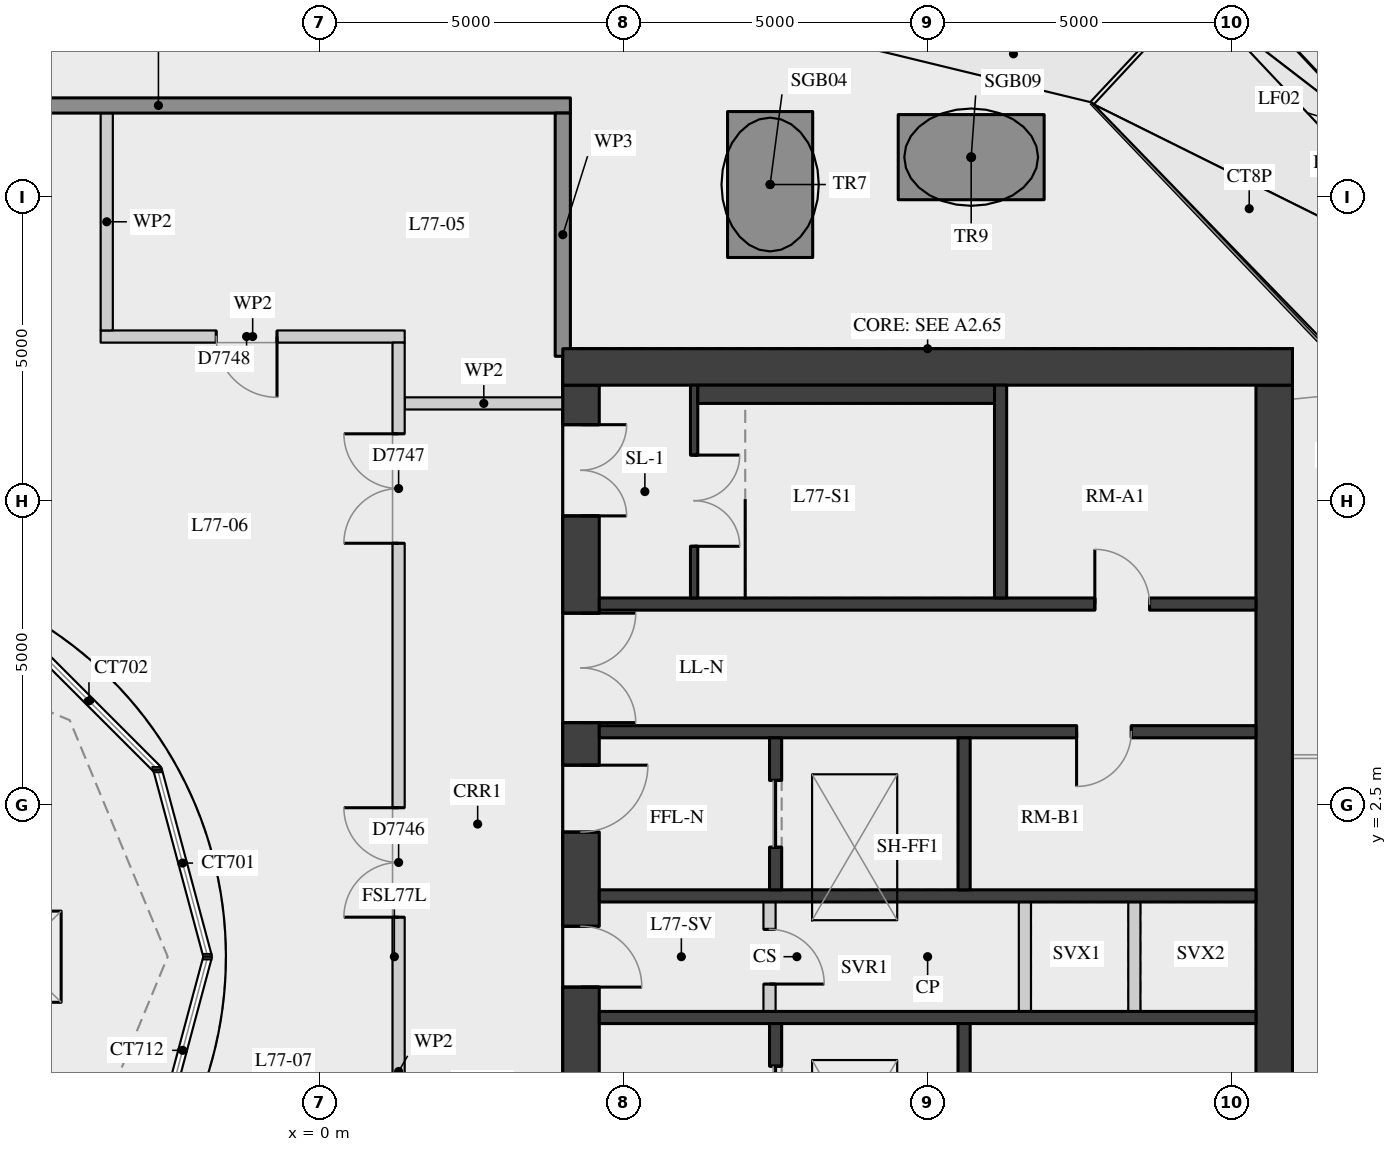
"""IFC4 building model, lengths in metres.
Left out: names, types, materials, properties, quantities, classifications, styles, units other than length and angle.
Written with IfcOpenShell. Run it as: python <this file> out.ifc"""

import sys

from ifc_helpers import new_model, si_unit, direction, frame, frame_2d, origin, origin_2d, place, context, subcontext, project, spatial, rectangle, extrude, element, fill, save


model = new_model("IFC4")
c1 = context("Model", 3, precision=1e-05, world=origin(), true_north=direction((0.0, 1.0)))
c2 = subcontext(c1, "Body", "Model", "MODEL_VIEW")
j1 = project(units=[si_unit("LENGTHUNIT", "METRE"), si_unit("PLANEANGLEUNIT", "RADIAN")], contexts=[c1])
p1 = place(None, origin())
s1 = spatial("IfcSite", under=j1, at=p1, CompositionType="ELEMENT")
p2 = place(p1, origin())
s2 = spatial("IfcBuilding", under=s1, at=p2, CompositionType="ELEMENT")
p3 = place(p2, frame((0.0, 0.0, 275.2)))
s3 = spatial("IfcBuildingStorey", under=s2, at=p3, CompositionType="ELEMENT", Elevation=275.2)
p4 = place(p3, frame((18.836, 14.586, 0.0), z_axis=(0.0, 0.0, 1.0), x_axis=(-0.742122328142, 0.670264462786, 0.0)))
e1 = element("IfcWall", 1, at=p4, inside=s3, PredefinedType="PARAPET", context=c2, shape_type="SweptSolid", body=[
    extrude(rectangle(XDim=4.179, YDim=0.25, at=frame_2d((2.089, 0.0))), origin(), (0.0, 0.0, 1.0), 1.2),
])
for number, where, z_axis, x_axis in (
    (2, (7.41, 11.5, 0.0), (0.0, 0.0, 1.0), (0.0, 1.0, 0.0)),
    (3, (11.917, 13.15, 0.0), (0.0, 0.0, 1.0), (-1.0, 0.0, 0.0)),
):
    element("IfcWall", number, at=place(p3, frame(where, z_axis=z_axis, x_axis=x_axis)), inside=s3, PredefinedType="USERDEFINED", context=c2, shape_type="SweptSolid", body=[
        extrude(rectangle(XDim=2.4, YDim=1.4, at=frame_2d((1.2, 0.0))), origin(), (0.0, 0.0, 1.0), 0.45),
    ])
p5 = place(p3, frame((4.3, -9.4, 0.0), z_axis=(0.0, 0.0, 1.0), x_axis=(0.0, 1.0, 0.0)))
e4 = element("IfcWall", 4, at=p5, inside=s3, PredefinedType="SHEAR", context=c2, shape_type="SweptSolid", body=[
    extrude(rectangle(XDim=18.8, YDim=0.6, at=frame_2d((9.4, 0.0))), origin(), (0.0, 0.0, 1.0), 5.0),
])
p6 = place(p5, frame((0.65, 0.0, 0.0)))
e5 = element("IfcOpeningElement", 5, at=p6, cuts=e4, PredefinedType="OPENING", context=c2, shape_type="SweptSolid", body=[
    extrude(rectangle(XDim=1.5, YDim=2.1, at=frame_2d((0.75, 1.05))), frame((0.0, 0.31, 0.0), z_axis=(0.0, -1.0, 0.0), x_axis=(1.0, 0.0, 0.0)), (0.0, 0.0, 1.0), 0.62),
])
p7 = place(p5, frame((3.75, 0.0, 0.0)))
e6 = element("IfcOpeningElement", 6, at=p7, cuts=e4, PredefinedType="OPENING", context=c2, shape_type="SweptSolid", body=[
    extrude(rectangle(XDim=1.8, YDim=2.1, at=frame_2d((0.9, 1.05))), frame((0.0, 0.31, 0.0), z_axis=(0.0, -1.0, 0.0), x_axis=(1.0, 0.0, 0.0)), (0.0, 0.0, 1.0), 0.62),
])
p8 = place(p5, frame((6.25, 0.0, 0.0)))
e7 = element("IfcOpeningElement", 7, at=p8, cuts=e4, PredefinedType="OPENING", context=c2, shape_type="SweptSolid", body=[
    extrude(rectangle(XDim=1.1, YDim=2.1, at=frame_2d((0.55, 1.05))), frame((0.0, 0.31, 0.0), z_axis=(0.0, -1.0, 0.0), x_axis=(1.0, 0.0, 0.0)), (0.0, 0.0, 1.0), 0.62),
])
p9 = place(p5, frame((8.9, 0.0, 0.0)))
e8 = element("IfcOpeningElement", 8, at=p9, cuts=e4, PredefinedType="OPENING", context=c2, shape_type="SweptSolid", body=[
    extrude(rectangle(XDim=1.0, YDim=2.1, at=frame_2d((0.5, 1.05))), frame((0.0, 0.31, 0.0), z_axis=(0.0, -1.0, 0.0), x_axis=(1.0, 0.0, 0.0)), (0.0, 0.0, 1.0), 0.62),
])
p10 = place(p5, frame((11.45, 0.0, 0.0)))
e9 = element("IfcOpeningElement", 9, at=p10, cuts=e4, PredefinedType="OPENING", context=c2, shape_type="SweptSolid", body=[
    extrude(rectangle(XDim=1.1, YDim=2.1, at=frame_2d((0.55, 1.05))), frame((0.0, 0.31, 0.0), z_axis=(0.0, -1.0, 0.0), x_axis=(1.0, 0.0, 0.0)), (0.0, 0.0, 1.0), 0.62),
])
p11 = place(p5, frame((13.25, 0.0, 0.0)))
e10 = element("IfcOpeningElement", 10, at=p11, cuts=e4, PredefinedType="OPENING", context=c2, shape_type="SweptSolid", body=[
    extrude(rectangle(XDim=1.8, YDim=2.1, at=frame_2d((0.9, 1.05))), frame((0.0, 0.31, 0.0), z_axis=(0.0, -1.0, 0.0), x_axis=(1.0, 0.0, 0.0)), (0.0, 0.0, 1.0), 0.62),
])
p12 = place(p5, frame((16.65, 0.0, 0.0)))
e11 = element("IfcOpeningElement", 11, at=p12, cuts=e4, PredefinedType="OPENING", context=c2, shape_type="SweptSolid", body=[
    extrude(rectangle(XDim=1.5, YDim=2.1, at=frame_2d((0.75, 1.05))), frame((0.0, 0.31, 0.0), z_axis=(0.0, -1.0, 0.0), x_axis=(1.0, 0.0, 0.0)), (0.0, 0.0, 1.0), 0.62),
])
p13 = place(p3, frame((15.7, -9.4, 0.0), z_axis=(0.0, 0.0, 1.0), x_axis=(0.0, 1.0, 0.0)))
e12 = element("IfcWall", 12, at=p13, inside=s3, PredefinedType="SHEAR", context=c2, shape_type="SweptSolid", body=[
    extrude(rectangle(XDim=18.8, YDim=0.6, at=frame_2d((9.4, 0.0))), origin(), (0.0, 0.0, 1.0), 5.0),
])
p14 = place(p3, frame((4.0, 9.7, 0.0), z_axis=(0.0, 0.0, 1.0), x_axis=(1.0, 0.0, 0.0)))
e13 = element("IfcWall", 13, at=p14, inside=s3, PredefinedType="SHEAR", context=c2, shape_type="SweptSolid", body=[
    extrude(rectangle(XDim=12.0, YDim=0.6, at=frame_2d((6.0, 0.0))), origin(), (0.0, 0.0, 1.0), 5.0),
])
p15 = place(p3, frame((4.6, 5.8, 0.0), z_axis=(0.0, 0.0, 1.0), x_axis=(1.0, 0.0, 0.0)))
e14 = element("IfcWall", 14, at=p15, inside=s3, PredefinedType="SHEAR", context=c2, shape_type="SweptSolid", body=[
    extrude(rectangle(XDim=10.8, YDim=0.2, at=frame_2d((5.4, 0.0))), origin(), (0.0, 0.0, 1.0), 5.0),
])
p16 = place(p15, frame((8.15, 0.0, 0.0)))
e15 = element("IfcOpeningElement", 15, at=p16, cuts=e14, PredefinedType="OPENING", context=c2, shape_type="SweptSolid", body=[
    extrude(rectangle(XDim=0.9, YDim=2.1, at=frame_2d((0.45, 1.05))), frame((0.0, 0.11, 0.0), z_axis=(0.0, -1.0, 0.0), x_axis=(1.0, 0.0, 0.0)), (0.0, 0.0, 1.0), 0.22),
])
p17 = place(p3, frame((4.6, 3.7, 0.0), z_axis=(0.0, 0.0, 1.0), x_axis=(1.0, 0.0, 0.0)))
e16 = element("IfcWall", 16, at=p17, inside=s3, PredefinedType="SHEAR", context=c2, shape_type="SweptSolid", body=[
    extrude(rectangle(XDim=10.8, YDim=0.2, at=frame_2d((5.4, 0.0))), origin(), (0.0, 0.0, 1.0), 5.0),
])
p18 = place(p17, frame((7.85, 0.0, 0.0)))
e17 = element("IfcOpeningElement", 17, at=p18, cuts=e16, PredefinedType="OPENING", context=c2, shape_type="SweptSolid", body=[
    extrude(rectangle(XDim=0.9, YDim=2.1, at=frame_2d((0.45, 1.05))), frame((0.0, 0.11, 0.0), z_axis=(0.0, -1.0, 0.0), x_axis=(1.0, 0.0, 0.0)), (0.0, 0.0, 1.0), 0.22),
])
for number, where, z_axis, x_axis in (
    (18, (4.6, 1.0, 0.0), (0.0, 0.0, 1.0), (1.0, 0.0, 0.0)),
    (19, (4.6, -1.0, 0.0), (0.0, 0.0, 1.0), (1.0, 0.0, 0.0)),
):
    element("IfcWall", number, at=place(p3, frame(where, z_axis=z_axis, x_axis=x_axis)), inside=s3, PredefinedType="SHEAR", context=c2, shape_type="SweptSolid", body=[
        extrude(rectangle(XDim=10.8, YDim=0.2, at=frame_2d((5.4, 0.0))), origin(), (0.0, 0.0, 1.0), 5.0),
    ])
p19 = place(p3, frame((11.2, 5.9, 0.0), z_axis=(0.0, 0.0, 1.0), x_axis=(0.0, 1.0, 0.0)))
e20 = element("IfcWall", 20, at=p19, inside=s3, PredefinedType="SHEAR", context=c2, shape_type="SweptSolid", body=[
    extrude(rectangle(XDim=3.5, YDim=0.2, at=frame_2d((1.75, 0.0))), origin(), (0.0, 0.0, 1.0), 5.0),
])
p20 = place(p3, frame((7.5, 1.1, 0.0), z_axis=(0.0, 0.0, 1.0), x_axis=(0.0, 1.0, 0.0)))
e21 = element("IfcWall", 21, at=p20, inside=s3, PredefinedType="SHEAR", context=c2, shape_type="SweptSolid", body=[
    extrude(rectangle(XDim=2.5, YDim=0.2, at=frame_2d((1.25, 0.0))), origin(), (0.0, 0.0, 1.0), 5.0),
])
p21 = place(p20, frame((0.7, 0.0, 0.0)))
e22 = element("IfcOpeningElement", 22, at=p21, cuts=e21, PredefinedType="OPENING", context=c2, shape_type="SweptSolid", body=[
    extrude(rectangle(XDim=1.1, YDim=2.1, at=frame_2d((0.55, 1.05))), frame((0.0, 0.11, 0.0), z_axis=(0.0, -1.0, 0.0), x_axis=(1.0, 0.0, 0.0)), (0.0, 0.0, 1.0), 0.22),
])
p22 = place(p3, frame((7.5, -3.6, 0.0), z_axis=(0.0, 0.0, 1.0), x_axis=(0.0, 1.0, 0.0)))
e23 = element("IfcWall", 23, at=p22, inside=s3, PredefinedType="SHEAR", context=c2, shape_type="SweptSolid", body=[
    extrude(rectangle(XDim=2.5, YDim=0.2, at=frame_2d((1.25, 0.0))), origin(), (0.0, 0.0, 1.0), 5.0),
])
p23 = place(p22, frame((0.7, 0.0, 0.0)))
e24 = element("IfcOpeningElement", 24, at=p23, cuts=e23, PredefinedType="OPENING", context=c2, shape_type="SweptSolid", body=[
    extrude(rectangle(XDim=1.1, YDim=2.1, at=frame_2d((0.55, 1.05))), frame((0.0, 0.11, 0.0), z_axis=(0.0, -1.0, 0.0), x_axis=(1.0, 0.0, 0.0)), (0.0, 0.0, 1.0), 0.22),
])
for number, where, z_axis, x_axis in (
    (25, (10.6, 1.1, 0.0), (0.0, 0.0, 1.0), (0.0, 1.0, 0.0)),
    (26, (10.6, -3.6, 0.0), (0.0, 0.0, 1.0), (0.0, 1.0, 0.0)),
):
    element("IfcWall", number, at=place(p3, frame(where, z_axis=z_axis, x_axis=x_axis)), inside=s3, PredefinedType="SHEAR", context=c2, shape_type="SweptSolid", body=[
        extrude(rectangle(XDim=2.5, YDim=0.2, at=frame_2d((1.25, 0.0))), origin(), (0.0, 0.0, 1.0), 5.0),
    ])
p24 = place(p3, frame((6.16, 5.9, 0.0), z_axis=(0.0, 0.0, 1.0), x_axis=(0.0, 1.0, 0.0)))
e27 = element("IfcWall", 27, at=p24, inside=s3, PredefinedType="SHEAR", context=c2, shape_type="SweptSolid", body=[
    extrude(rectangle(XDim=3.5, YDim=0.12, at=frame_2d((1.75, 0.0))), origin(), (0.0, 0.0, 1.0), 5.0),
])
p25 = place(p24, frame((0.85, 0.0, 0.0)))
e28 = element("IfcOpeningElement", 28, at=p25, cuts=e27, PredefinedType="OPENING", context=c2, shape_type="SweptSolid", body=[
    extrude(rectangle(XDim=1.5, YDim=2.1, at=frame_2d((0.75, 1.05))), frame((0.0, 0.07, 0.0), z_axis=(0.0, -1.0, 0.0), x_axis=(1.0, 0.0, 0.0)), (0.0, 0.0, 1.0), 0.14),
])
p26 = place(p3, frame((7.4, -0.9, 0.0), z_axis=(0.0, 0.0, 1.0), x_axis=(0.0, 1.0, 0.0)))
e29 = element("IfcWall", 29, at=p26, inside=s3, PredefinedType="PARTITIONING", context=c2, shape_type="SweptSolid", body=[
    extrude(rectangle(XDim=1.8, YDim=0.2, at=frame_2d((0.9, 0.0))), origin(), (0.0, 0.0, 1.0), 5.0),
])
p27 = place(p26, frame((0.45, 0.0, 0.0)))
e30 = element("IfcOpeningElement", 30, at=p27, cuts=e29, PredefinedType="OPENING", context=c2, shape_type="SweptSolid", body=[
    extrude(rectangle(XDim=0.9, YDim=2.1, at=frame_2d((0.45, 1.05))), frame((0.0, 0.11, 0.0), z_axis=(0.0, -1.0, 0.0), x_axis=(1.0, 0.0, 0.0)), (0.0, 0.0, 1.0), 0.22),
])
for number, where, z_axis, x_axis in (
    (31, (11.6, -0.9, 0.0), (0.0, 0.0, 1.0), (0.0, 1.0, 0.0)),
    (32, (13.4, -0.9, 0.0), (0.0, 0.0, 1.0), (0.0, 1.0, 0.0)),
):
    element("IfcWall", number, at=place(p3, frame(where, z_axis=z_axis, x_axis=x_axis)), inside=s3, PredefinedType="PARTITIONING", context=c2, shape_type="SweptSolid", body=[
        extrude(rectangle(XDim=1.8, YDim=0.2, at=frame_2d((0.9, 0.0))), origin(), (0.0, 0.0, 1.0), 5.0),
    ])
p28 = place(p3, frame((6.22, 9.25, 0.0), z_axis=(0.0, 0.0, 1.0), x_axis=(1.0, 0.0, 0.0)))
e33 = element("IfcWall", 33, at=p28, inside=s3, PredefinedType="PARTITIONING", context=c2, shape_type="SweptSolid", body=[
    extrude(rectangle(XDim=4.88, YDim=0.3, at=frame_2d((2.44, 0.0))), origin(), (0.0, 0.0, 1.0), 5.0),
])
p29 = place(p3, frame((1.4, 9.1, 0.0), z_axis=(0.0, 0.0, 1.0), x_axis=(1.0, 0.0, 0.0)))
e34 = element("IfcWall", 34, at=p29, inside=s3, PredefinedType="PARTITIONING", context=c2, shape_type="SweptSolid", body=[
    extrude(rectangle(XDim=2.602, YDim=0.2, at=frame_2d((1.301, 0.0))), origin(), (0.0, 0.0, 1.0), 6.0),
])
p30 = place(p3, frame((-3.6, 10.2, 0.0), z_axis=(0.0, 0.0, 1.0), x_axis=(1.0, 0.0, 0.0)))
e35 = element("IfcWall", 35, at=p30, inside=s3, PredefinedType="PARTITIONING", context=c2, shape_type="SweptSolid", body=[
    extrude(rectangle(XDim=5.0, YDim=0.2, at=frame_2d((2.5, 0.0))), origin(), (0.0, 0.0, 1.0), 6.0),
])
p31 = place(p30, frame((1.9, 0.0, 0.0)))
e36 = element("IfcOpeningElement", 36, at=p31, cuts=e35, PredefinedType="OPENING", context=c2, shape_type="SweptSolid", body=[
    extrude(rectangle(XDim=1.0, YDim=2.1, at=frame_2d((0.5, 1.05))), frame((0.0, 0.11, 0.0), z_axis=(0.0, -1.0, 0.0), x_axis=(1.0, 0.0, 0.0)), (0.0, 0.0, 1.0), 0.22),
])
p32 = place(p3, frame((-9.425, 14.0, 0.0), z_axis=(0.0, 0.0, 1.0), x_axis=(1.0, 0.0, 0.0)))
e37 = element("IfcWall", 37, at=p32, inside=s3, PredefinedType="PARTITIONING", context=c2, shape_type="SweptSolid", body=[
    extrude(rectangle(XDim=13.55, YDim=0.25, at=frame_2d((6.775, 0.0))), origin(), (0.0, 0.0, 1.0), 6.0),
])
p33 = place(p32, frame((2.025, 0.0, 0.0)))
e38 = element("IfcOpeningElement", 38, at=p33, cuts=e37, PredefinedType="OPENING", context=c2, shape_type="SweptSolid", body=[
    extrude(rectangle(XDim=1.8, YDim=2.4, at=frame_2d((0.9, 1.2))), frame((0.0, 0.135, 0.0), z_axis=(0.0, -1.0, 0.0), x_axis=(1.0, 0.0, 0.0)), (0.0, 0.0, 1.0), 0.27),
])
p34 = place(p3, frame((-3.5, 10.3, 0.0), z_axis=(0.0, 0.0, 1.0), x_axis=(0.0, 1.0, 0.0)))
e39 = element("IfcWall", 39, at=p34, inside=s3, PredefinedType="PARTITIONING", context=c2, shape_type="SweptSolid", body=[
    extrude(rectangle(XDim=3.575, YDim=0.2, at=frame_2d((1.788, 0.0))), origin(), (0.0, 0.0, 1.0), 6.0),
])
p35 = place(p3, frame((1.3, -13.875, 0.0), z_axis=(0.0, 0.0, 1.0), x_axis=(0.0, 1.0, 0.0)))
e40 = element("IfcWall", 40, at=p35, inside=s3, PredefinedType="PARTITIONING", context=c2, shape_type="SweptSolid", body=[
    extrude(rectangle(XDim=23.975, YDim=0.2, at=frame_2d((11.988, 0.0))), origin(), (0.0, 0.0, 1.0), 6.0),
])
p36 = place(p35, frame((20.675, 0.0, 0.0)))
e41 = element("IfcOpeningElement", 41, at=p36, cuts=e40, PredefinedType="OPENING", context=c2, shape_type="SweptSolid", body=[
    extrude(rectangle(XDim=1.8, YDim=2.1, at=frame_2d((0.9, 1.05))), frame((0.0, 0.11, 0.0), z_axis=(0.0, -1.0, 0.0), x_axis=(1.0, 0.0, 0.0)), (0.0, 0.0, 1.0), 0.22),
])
p37 = place(p35, frame((14.525, 0.0, 0.0)))
e42 = element("IfcOpeningElement", 42, at=p37, cuts=e40, PredefinedType="OPENING", context=c2, shape_type="SweptSolid", body=[
    extrude(rectangle(XDim=1.8, YDim=2.1, at=frame_2d((0.9, 1.05))), frame((0.0, 0.11, 0.0), z_axis=(0.0, -1.0, 0.0), x_axis=(1.0, 0.0, 0.0)), (0.0, 0.0, 1.0), 0.22),
])
p38 = place(p35, frame((0.975, 0.0, 0.0)))
e43 = element("IfcOpeningElement", 43, at=p38, cuts=e40, PredefinedType="OPENING", context=c2, shape_type="SweptSolid", body=[
    extrude(rectangle(XDim=1.0, YDim=2.1, at=frame_2d((0.5, 1.05))), frame((0.0, 0.11, 0.0), z_axis=(0.0, -1.0, 0.0), x_axis=(1.0, 0.0, 0.0)), (0.0, 0.0, 1.0), 0.22),
])
p39 = place(p35, frame((3.825, 0.0, 0.0)))
e44 = element("IfcOpeningElement", 44, at=p39, cuts=e40, PredefinedType="OPENING", context=c2, shape_type="SweptSolid", body=[
    extrude(rectangle(XDim=1.0, YDim=2.1, at=frame_2d((0.5, 1.05))), frame((0.0, 0.11, 0.0), z_axis=(0.0, -1.0, 0.0), x_axis=(1.0, 0.0, 0.0)), (0.0, 0.0, 1.0), 0.22),
])
p40 = place(p35, frame((6.425, 0.0, 0.0)))
e45 = element("IfcOpeningElement", 45, at=p40, cuts=e40, PredefinedType="OPENING", context=c2, shape_type="SweptSolid", body=[
    extrude(rectangle(XDim=1.0, YDim=2.1, at=frame_2d((0.5, 1.05))), frame((0.0, 0.11, 0.0), z_axis=(0.0, -1.0, 0.0), x_axis=(1.0, 0.0, 0.0)), (0.0, 0.0, 1.0), 0.22),
])
p41 = place(p3, frame((4.0, 9.875, 0.0), z_axis=(0.0, 0.0, 1.0), x_axis=(0.0, 1.0, 0.0)))
e46 = element("IfcWall", 46, at=p41, inside=s3, PredefinedType="PARTITIONING", context=c2, shape_type="SweptSolid", body=[
    extrude(rectangle(XDim=4.0, YDim=0.25, at=frame_2d((2.0, 0.0))), origin(), (0.0, 0.0, 1.0), 6.0),
])
p42 = place(p3, frame((0.0, 0.0, 1.8)))
p43 = place(p42, frame((-5.0, 0.0, 0.0)))
p44 = place(p43, frame((0.0, 0.0, 0.1)))
e47 = element("IfcWindow", 47, at=p44, inside=s3, PartitioningType="SINGLE_PANEL", PredefinedType="SKYLIGHT", context=c2, shape_type="SweptSolid", body=[
    extrude(rectangle(XDim=1.5, YDim=1.5, at=origin_2d()), origin(), (0.0, 0.0, 1.0), 0.05),
])
p45 = place(p9, origin())
e48 = element("IfcDoor", 48, at=p45, inside=s3, OperationType="SINGLE_SWING_RIGHT", PredefinedType="DOOR", context=c2, shape_type="SweptSolid", body=[
    extrude(rectangle(XDim=1.0, YDim=2.1, at=frame_2d((0.5, 1.05))), frame((0.0, 0.025, 0.0), z_axis=(0.0, -1.0, 0.0), x_axis=(1.0, 0.0, 0.0)), (0.0, 0.0, 1.0), 0.05),
])
fill(e8, e48)
p46 = place(p10, origin())
e49 = element("IfcDoor", 49, at=p46, inside=s3, OperationType="SINGLE_SWING_LEFT", PredefinedType="DOOR", context=c2, shape_type="SweptSolid", body=[
    extrude(rectangle(XDim=1.1, YDim=2.1, at=frame_2d((0.55, 1.05))), frame((0.0, 0.025, 0.0), z_axis=(0.0, -1.0, 0.0), x_axis=(1.0, 0.0, 0.0)), (0.0, 0.0, 1.0), 0.05),
])
fill(e9, e49)
p47 = place(p11, origin())
e50 = element("IfcDoor", 50, at=p47, inside=s3, OperationType="DOUBLE_DOOR_SINGLE_SWING", PredefinedType="DOOR", context=c2, shape_type="SweptSolid", body=[
    extrude(rectangle(XDim=1.8, YDim=2.1, at=frame_2d((0.9, 1.05))), frame((0.0, 0.025, 0.0), z_axis=(0.0, -1.0, 0.0), x_axis=(1.0, 0.0, 0.0)), (0.0, 0.0, 1.0), 0.05),
])
fill(e10, e50)
p48 = place(p12, origin())
e51 = element("IfcDoor", 51, at=p48, inside=s3, OperationType="DOUBLE_DOOR_SINGLE_SWING", PredefinedType="DOOR", context=c2, shape_type="SweptSolid", body=[
    extrude(rectangle(XDim=1.5, YDim=2.1, at=frame_2d((0.75, 1.05))), frame((0.0, 0.025, 0.0), z_axis=(0.0, -1.0, 0.0), x_axis=(1.0, 0.0, 0.0)), (0.0, 0.0, 1.0), 0.05),
])
fill(e11, e51)
p49 = place(p25, origin())
e52 = element("IfcDoor", 52, at=p49, inside=s3, OperationType="DOUBLE_DOOR_SINGLE_SWING", PredefinedType="DOOR", context=c2, shape_type="SweptSolid", body=[
    extrude(rectangle(XDim=1.5, YDim=2.1, at=frame_2d((0.75, 1.05))), frame((0.0, 0.025, 0.0), z_axis=(0.0, -1.0, 0.0), x_axis=(1.0, 0.0, 0.0)), (0.0, 0.0, 1.0), 0.05),
])
fill(e28, e52)
p50 = place(p16, origin())
e53 = element("IfcDoor", 53, at=p50, inside=s3, OperationType="SINGLE_SWING_LEFT", PredefinedType="DOOR", context=c2, shape_type="SweptSolid", body=[
    extrude(rectangle(XDim=0.9, YDim=2.1, at=frame_2d((0.45, 1.05))), frame((0.0, 0.025, 0.0), z_axis=(0.0, -1.0, 0.0), x_axis=(1.0, 0.0, 0.0)), (0.0, 0.0, 1.0), 0.05),
])
fill(e15, e53)
p51 = place(p18, origin())
e54 = element("IfcDoor", 54, at=p51, inside=s3, OperationType="SINGLE_SWING_RIGHT", PredefinedType="DOOR", context=c2, shape_type="SweptSolid", body=[
    extrude(rectangle(XDim=0.9, YDim=2.1, at=frame_2d((0.45, 1.05))), frame((0.0, 0.025, 0.0), z_axis=(0.0, -1.0, 0.0), x_axis=(1.0, 0.0, 0.0)), (0.0, 0.0, 1.0), 0.05),
])
fill(e17, e54)
p52 = place(p21, origin())
e55 = element("IfcDoor", 55, at=p52, inside=s3, OperationType="DOUBLE_DOOR_SLIDING", PredefinedType="DOOR", context=c2, shape_type="SweptSolid", body=[
    extrude(rectangle(XDim=1.1, YDim=2.1, at=frame_2d((0.55, 1.05))), frame((0.0, 0.025, 0.0), z_axis=(0.0, -1.0, 0.0), x_axis=(1.0, 0.0, 0.0)), (0.0, 0.0, 1.0), 0.05),
])
fill(e22, e55)
p53 = place(p23, origin())
e56 = element("IfcDoor", 56, at=p53, inside=s3, OperationType="DOUBLE_DOOR_SLIDING", PredefinedType="DOOR", context=c2, shape_type="SweptSolid", body=[
    extrude(rectangle(XDim=1.1, YDim=2.1, at=frame_2d((0.55, 1.05))), frame((0.0, 0.025, 0.0), z_axis=(0.0, -1.0, 0.0), x_axis=(1.0, 0.0, 0.0)), (0.0, 0.0, 1.0), 0.05),
])
fill(e24, e56)
p54 = place(p27, origin())
e57 = element("IfcDoor", 57, at=p54, inside=s3, OperationType="SINGLE_SWING_RIGHT", PredefinedType="DOOR", context=c2, shape_type="SweptSolid", body=[
    extrude(rectangle(XDim=0.9, YDim=2.1, at=frame_2d((0.45, 1.05))), frame((0.0, 0.025, 0.0), z_axis=(0.0, -1.0, 0.0), x_axis=(1.0, 0.0, 0.0)), (0.0, 0.0, 1.0), 0.05),
])
fill(e30, e57)
p55 = place(p36, origin())
e58 = element("IfcDoor", 58, at=p55, inside=s3, OperationType="DOUBLE_DOOR_SINGLE_SWING", PredefinedType="DOOR", context=c2, shape_type="SweptSolid", body=[
    extrude(rectangle(XDim=1.8, YDim=2.1, at=frame_2d((0.9, 1.05))), frame((0.0, 0.025, 0.0), z_axis=(0.0, -1.0, 0.0), x_axis=(1.0, 0.0, 0.0)), (0.0, 0.0, 1.0), 0.05),
])
fill(e41, e58)
p56 = place(p37, origin())
e59 = element("IfcDoor", 59, at=p56, inside=s3, OperationType="DOUBLE_DOOR_SINGLE_SWING", PredefinedType="DOOR", context=c2, shape_type="SweptSolid", body=[
    extrude(rectangle(XDim=1.8, YDim=2.1, at=frame_2d((0.9, 1.05))), frame((0.0, 0.025, 0.0), z_axis=(0.0, -1.0, 0.0), x_axis=(1.0, 0.0, 0.0)), (0.0, 0.0, 1.0), 0.05),
])
fill(e42, e59)
p57 = place(p31, origin())
e60 = element("IfcDoor", 60, at=p57, inside=s3, OperationType="SINGLE_SWING_LEFT", PredefinedType="DOOR", context=c2, shape_type="SweptSolid", body=[
    extrude(rectangle(XDim=1.0, YDim=2.1, at=frame_2d((0.5, 1.05))), frame((0.0, 0.025, 0.0), z_axis=(0.0, -1.0, 0.0), x_axis=(1.0, 0.0, 0.0)), (0.0, 0.0, 1.0), 0.05),
])
fill(e36, e60)
save(model, sys.argv[1])
